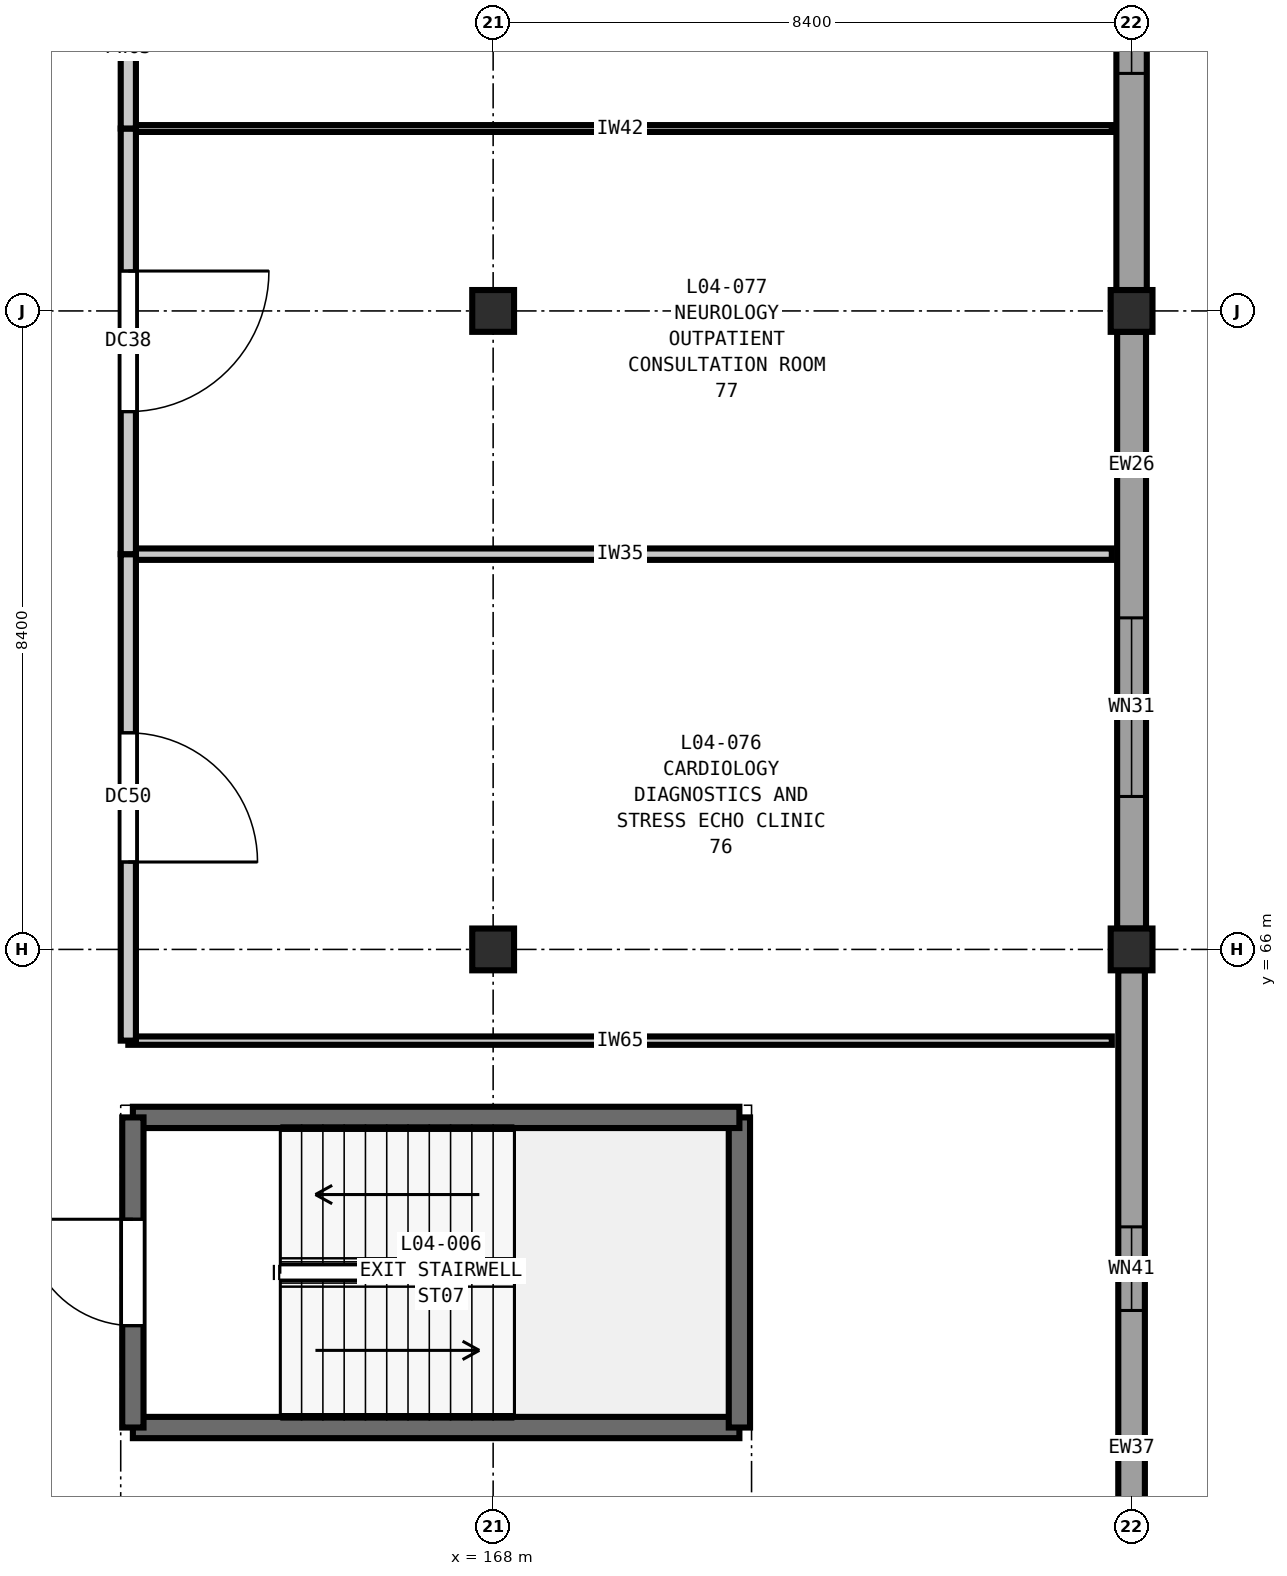
"""IFC4 building model, lengths in metres.
Left out: names, types, materials, properties, quantities, classifications, styles, units other than length and angle.
Written with IfcOpenShell. Run it as: python <this file> out.ifc"""

import sys

from ifc_helpers import new_model, si_unit, direction, frame, frame_2d, origin, origin_2d, place, context, subcontext, project, spatial, rectangle, extrude, element, fill, save


model = new_model("IFC4")
c1 = context("Model", 3, precision=1e-05, world=origin(), true_north=direction((0.0, 1.0)))
c2 = subcontext(c1, "Body", "Model", "MODEL_VIEW")
j1 = project(units=[si_unit("LENGTHUNIT", "METRE"), si_unit("PLANEANGLEUNIT", "RADIAN")], contexts=[c1])
p1 = place(None, origin())
s1 = spatial("IfcSite", under=j1, at=p1, CompositionType="ELEMENT")
p2 = place(p1, origin())
s2 = spatial("IfcBuilding", under=s1, at=p2, CompositionType="ELEMENT")
p3 = place(p2, frame((0.0, 0.0, 20.4)))
s3 = spatial("IfcBuildingStorey", under=s2, at=p3, CompositionType="ELEMENT", Elevation=20.4)
for number, where, z_axis, x_axis in (
    (1, (168.0, 66.0, 0.0), (0.0, 0.0, 1.0), (1.0, 0.0, 0.0)),
    (2, (168.0, 74.4, 0.0), (0.0, 0.0, 1.0), (1.0, 0.0, 0.0)),
    (3, (176.4, 66.0, 0.0), (0.0, 0.0, 1.0), (1.0, 0.0, 0.0)),
    (4, (176.4, 74.4, 0.0), (0.0, 0.0, 1.0), (1.0, 0.0, 0.0)),
):
    element("IfcColumn", number, at=place(p3, frame(where, z_axis=z_axis, x_axis=x_axis)), inside=s3, PredefinedType="COLUMN", context=c2, shape_type="SweptSolid", body=[
        extrude(rectangle(XDim=0.55, YDim=0.55, at=origin_2d()), origin(), (0.0, 0.0, 1.0), 4.2),
    ])
p4 = place(p3, frame((176.4, 82.527, 0.0), z_axis=(0.0, 0.0, 1.0), x_axis=(0.0, -1.0, 0.0)))
e5 = element("IfcWall", 5, at=p4, inside=s3, PredefinedType="SOLIDWALL", context=c2, shape_type="SweptSolid", body=[
    extrude(rectangle(XDim=7.854, YDim=0.4, at=frame_2d((3.927, 0.0))), origin(), (0.0, 0.0, 1.0), 3.48),
])
p5 = place(p4, frame((2.852, 0.0, 0.9)))
e6 = element("IfcOpeningElement", 6, at=p5, cuts=e5, PredefinedType="OPENING", context=c2, shape_type="SweptSolid", body=[
    extrude(rectangle(XDim=2.15, YDim=1.75, at=frame_2d((1.075, 0.875))), frame((0.0, 0.21, 0.0), z_axis=(0.0, -1.0, 0.0), x_axis=(1.0, 0.0, 0.0)), (0.0, 0.0, 1.0), 0.42),
])
p6 = place(p3, frame((176.4, 74.127, 0.0), z_axis=(0.0, 0.0, 1.0), x_axis=(0.0, -1.0, 0.0)))
e7 = element("IfcWall", 7, at=p6, inside=s3, PredefinedType="SOLIDWALL", context=c2, shape_type="SweptSolid", body=[
    extrude(rectangle(XDim=7.854, YDim=0.38, at=frame_2d((3.927, 0.0))), origin(), (0.0, 0.0, 1.0), 3.48),
])
p7 = place(p6, frame((3.765, 0.0, 0.9)))
e8 = element("IfcOpeningElement", 8, at=p7, cuts=e7, PredefinedType="OPENING", context=c2, shape_type="SweptSolid", body=[
    extrude(rectangle(XDim=2.35, YDim=1.75, at=frame_2d((1.175, 0.875))), frame((0.0, 0.2, 0.0), z_axis=(0.0, -1.0, 0.0), x_axis=(1.0, 0.0, 0.0)), (0.0, 0.0, 1.0), 0.4),
])
p8 = place(p3, frame((176.4, 65.727, 0.0), z_axis=(0.0, 0.0, 1.0), x_axis=(0.0, -1.0, 0.0)))
e9 = element("IfcWall", 9, at=p8, inside=s3, PredefinedType="SOLIDWALL", context=c2, shape_type="SweptSolid", body=[
    extrude(rectangle(XDim=7.854, YDim=0.35, at=frame_2d((3.927, 0.0))), origin(), (0.0, 0.0, 1.0), 3.48),
])
p9 = place(p8, frame((3.377, 0.0, 0.9)))
e10 = element("IfcOpeningElement", 10, at=p9, cuts=e9, PredefinedType="OPENING", context=c2, shape_type="SweptSolid", body=[
    extrude(rectangle(XDim=1.1, YDim=1.95, at=frame_2d((0.55, 0.975))), frame((0.0, 0.185, 0.0), z_axis=(0.0, -1.0, 0.0), x_axis=(1.0, 0.0, 0.0)), (0.0, 0.0, 1.0), 0.37),
])
p10 = place(p3, frame((163.26, 59.71, 0.0), z_axis=(0.0, 0.0, 1.0), x_axis=(1.0, 0.0, 0.0)))
e11 = element("IfcWall", 11, at=p10, inside=s3, PredefinedType="SHEAR", context=c2, shape_type="SweptSolid", body=[
    extrude(rectangle(XDim=7.98, YDim=0.28, at=frame_2d((3.99, 0.0))), origin(), (0.0, 0.0, 1.0), 4.2),
])
p11 = place(p3, frame((171.24, 59.71, 0.0), z_axis=(0.0, 0.0, 1.0), x_axis=(0.0, 1.0, 0.0)))
e12 = element("IfcWall", 12, at=p11, inside=s3, PredefinedType="SHEAR", context=c2, shape_type="SweptSolid", body=[
    extrude(rectangle(XDim=4.08, YDim=0.28, at=frame_2d((2.04, 0.0))), origin(), (0.0, 0.0, 1.0), 4.2),
])
p12 = place(p3, frame((171.24, 63.79, 0.0), z_axis=(0.0, 0.0, 1.0), x_axis=(-1.0, 0.0, 0.0)))
e13 = element("IfcWall", 13, at=p12, inside=s3, PredefinedType="SHEAR", context=c2, shape_type="SweptSolid", body=[
    extrude(rectangle(XDim=7.98, YDim=0.28, at=frame_2d((3.99, 0.0))), origin(), (0.0, 0.0, 1.0), 4.2),
])
p13 = place(p3, frame((163.26, 63.79, 0.0), z_axis=(0.0, 0.0, 1.0), x_axis=(0.0, -1.0, 0.0)))
e14 = element("IfcWall", 14, at=p13, inside=s3, PredefinedType="SHEAR", context=c2, shape_type="SweptSolid", body=[
    extrude(rectangle(XDim=4.08, YDim=0.28, at=frame_2d((2.04, 0.0))), origin(), (0.0, 0.0, 1.0), 4.2),
])
p14 = place(p13, frame((1.34, 0.0, 0.0)))
e15 = element("IfcOpeningElement", 15, at=p14, cuts=e14, PredefinedType="OPENING", context=c2, shape_type="SweptSolid", body=[
    extrude(rectangle(XDim=1.4, YDim=2.2, at=frame_2d((0.7, 1.1))), frame((0.0, 0.15, 0.0), z_axis=(0.0, -1.0, 0.0), x_axis=(1.0, 0.0, 0.0)), (0.0, 0.0, 1.0), 0.3),
])
p15 = place(p3, frame((163.2, 64.8, 0.0), z_axis=(0.0, 0.0, 1.0), x_axis=(1.0, 0.0, 0.0)))
e16 = element("IfcWall", 16, at=p15, inside=s3, PredefinedType="PARTITIONING", context=c2, shape_type="SweptSolid", body=[
    extrude(rectangle(XDim=12.94, YDim=0.11, at=frame_2d((6.47, 0.0))), origin(), (0.0, 0.0, 1.0), 3.82),
])
p16 = place(p3, frame((163.2, 71.2, 0.0), z_axis=(0.0, 0.0, 1.0), x_axis=(1.0, 0.0, 0.0)))
e17 = element("IfcWall", 17, at=p16, inside=s3, PredefinedType="PARTITIONING", context=c2, shape_type="SweptSolid", body=[
    extrude(rectangle(XDim=12.94, YDim=0.15, at=frame_2d((6.47, 0.0))), origin(), (0.0, 0.0, 1.0), 3.82),
])
p17 = place(p3, frame((163.2, 76.8, 0.0), z_axis=(0.0, 0.0, 1.0), x_axis=(1.0, 0.0, 0.0)))
e18 = element("IfcWall", 18, at=p17, inside=s3, PredefinedType="PARTITIONING", context=c2, shape_type="SweptSolid", body=[
    extrude(rectangle(XDim=12.94, YDim=0.09, at=frame_2d((6.47, 0.0))), origin(), (0.0, 0.0, 1.0), 3.82),
])
p18 = place(p3, frame((163.2, 64.8, 0.0), z_axis=(0.0, 0.0, 1.0), x_axis=(0.0, 1.0, 0.0)))
e19 = element("IfcWall", 19, at=p18, inside=s3, PredefinedType="PARTITIONING", context=c2, shape_type="SweptSolid", body=[
    extrude(rectangle(XDim=6.4, YDim=0.2, at=frame_2d((3.2, 0.0))), origin(), (0.0, 0.0, 1.0), 3.82),
])
p19 = place(p18, frame((2.35, 0.0, 0.0)))
e20 = element("IfcOpeningElement", 20, at=p19, cuts=e19, PredefinedType="OPENING", context=c2, shape_type="SweptSolid", body=[
    extrude(rectangle(XDim=1.7, YDim=2.3, at=frame_2d((0.85, 1.15))), frame((0.0, 0.11, 0.0), z_axis=(0.0, -1.0, 0.0), x_axis=(1.0, 0.0, 0.0)), (0.0, 0.0, 1.0), 0.22),
])
p20 = place(p3, frame((163.2, 71.2, 0.0), z_axis=(0.0, 0.0, 1.0), x_axis=(0.0, 1.0, 0.0)))
e21 = element("IfcWall", 21, at=p20, inside=s3, PredefinedType="PARTITIONING", context=c2, shape_type="SweptSolid", body=[
    extrude(rectangle(XDim=5.6, YDim=0.2, at=frame_2d((2.8, 0.0))), origin(), (0.0, 0.0, 1.0), 3.82),
])
p21 = place(p20, frame((1.875, 0.0, 0.0)))
e22 = element("IfcOpeningElement", 22, at=p21, cuts=e21, PredefinedType="OPENING", context=c2, shape_type="SweptSolid", body=[
    extrude(rectangle(XDim=1.85, YDim=2.3, at=frame_2d((0.925, 1.15))), frame((0.0, 0.11, 0.0), z_axis=(0.0, -1.0, 0.0), x_axis=(1.0, 0.0, 0.0)), (0.0, 0.0, 1.0), 0.22),
])
p22 = place(p3, frame((163.2, 76.8, 0.0), z_axis=(0.0, 0.0, 1.0), x_axis=(0.0, 1.0, 0.0)))
e23 = element("IfcWall", 23, at=p22, inside=s3, PredefinedType="PARTITIONING", context=c2, shape_type="SweptSolid", body=[
    extrude(rectangle(XDim=6.0, YDim=0.2, at=frame_2d((3.0, 0.0))), origin(), (0.0, 0.0, 1.0), 3.82),
])
p23 = place(p22, frame((2.375, 0.0, 0.0)))
e24 = element("IfcOpeningElement", 24, at=p23, cuts=e23, PredefinedType="OPENING", context=c2, shape_type="SweptSolid", body=[
    extrude(rectangle(XDim=1.25, YDim=2.15, at=frame_2d((0.625, 1.075))), frame((0.0, 0.11, 0.0), z_axis=(0.0, -1.0, 0.0), x_axis=(1.0, 0.0, 0.0)), (0.0, 0.0, 1.0), 0.22),
])
p24 = place(p5, origin())
e25 = element("IfcWindow", 25, at=p24, inside=s3, PartitioningType="DOUBLE_PANEL_VERTICAL", PredefinedType="WINDOW", context=c2, shape_type="SweptSolid", body=[
    extrude(rectangle(XDim=2.15, YDim=1.75, at=frame_2d((1.075, 0.875))), frame((0.0, 0.03, 0.0), z_axis=(0.0, -1.0, 0.0), x_axis=(1.0, 0.0, 0.0)), (0.0, 0.0, 1.0), 0.06),
])
fill(e6, e25)
p25 = place(p7, origin())
e26 = element("IfcWindow", 26, at=p25, inside=s3, PartitioningType="DOUBLE_PANEL_VERTICAL", PredefinedType="WINDOW", context=c2, shape_type="SweptSolid", body=[
    extrude(rectangle(XDim=2.35, YDim=1.75, at=frame_2d((1.175, 0.875))), frame((0.0, 0.03, 0.0), z_axis=(0.0, -1.0, 0.0), x_axis=(1.0, 0.0, 0.0)), (0.0, 0.0, 1.0), 0.06),
])
fill(e8, e26)
p26 = place(p9, origin())
e27 = element("IfcWindow", 27, at=p26, inside=s3, PartitioningType="SINGLE_PANEL", PredefinedType="WINDOW", context=c2, shape_type="SweptSolid", body=[
    extrude(rectangle(XDim=1.1, YDim=1.95, at=frame_2d((0.55, 0.975))), frame((0.0, 0.03, 0.0), z_axis=(0.0, -1.0, 0.0), x_axis=(1.0, 0.0, 0.0)), (0.0, 0.0, 1.0), 0.06),
])
fill(e10, e27)
p27 = place(p14, frame((1.4, 0.0, 0.0), z_axis=(0.0, 0.0, 1.0), x_axis=(-1.0, 0.0, 0.0)))
e28 = element("IfcDoor", 28, at=p27, inside=s3, OperationType="SINGLE_SWING_RIGHT", PredefinedType="DOOR", context=c2, shape_type="SweptSolid", body=[
    extrude(rectangle(XDim=1.4, YDim=2.2, at=frame_2d((0.7, 1.1))), frame((0.0, 0.025, 0.0), z_axis=(0.0, -1.0, 0.0), x_axis=(1.0, 0.0, 0.0)), (0.0, 0.0, 1.0), 0.05),
])
fill(e15, e28)
p28 = place(p19, frame((1.7, 0.0, 0.0), z_axis=(0.0, 0.0, 1.0), x_axis=(-1.0, 0.0, 0.0)))
e29 = element("IfcDoor", 29, at=p28, inside=s3, OperationType="SINGLE_SWING_RIGHT", PredefinedType="DOOR", context=c2, shape_type="SweptSolid", body=[
    extrude(rectangle(XDim=1.7, YDim=2.3, at=frame_2d((0.85, 1.15))), frame((0.0, 0.025, 0.0), z_axis=(0.0, -1.0, 0.0), x_axis=(1.0, 0.0, 0.0)), (0.0, 0.0, 1.0), 0.05),
])
fill(e20, e29)
p29 = place(p21, frame((1.85, 0.0, 0.0), z_axis=(0.0, 0.0, 1.0), x_axis=(-1.0, 0.0, 0.0)))
e30 = element("IfcDoor", 30, at=p29, inside=s3, OperationType="SINGLE_SWING_LEFT", PredefinedType="DOOR", context=c2, shape_type="SweptSolid", body=[
    extrude(rectangle(XDim=1.85, YDim=2.3, at=frame_2d((0.925, 1.15))), frame((0.0, 0.025, 0.0), z_axis=(0.0, -1.0, 0.0), x_axis=(1.0, 0.0, 0.0)), (0.0, 0.0, 1.0), 0.05),
])
fill(e22, e30)
save(model, sys.argv[1])
